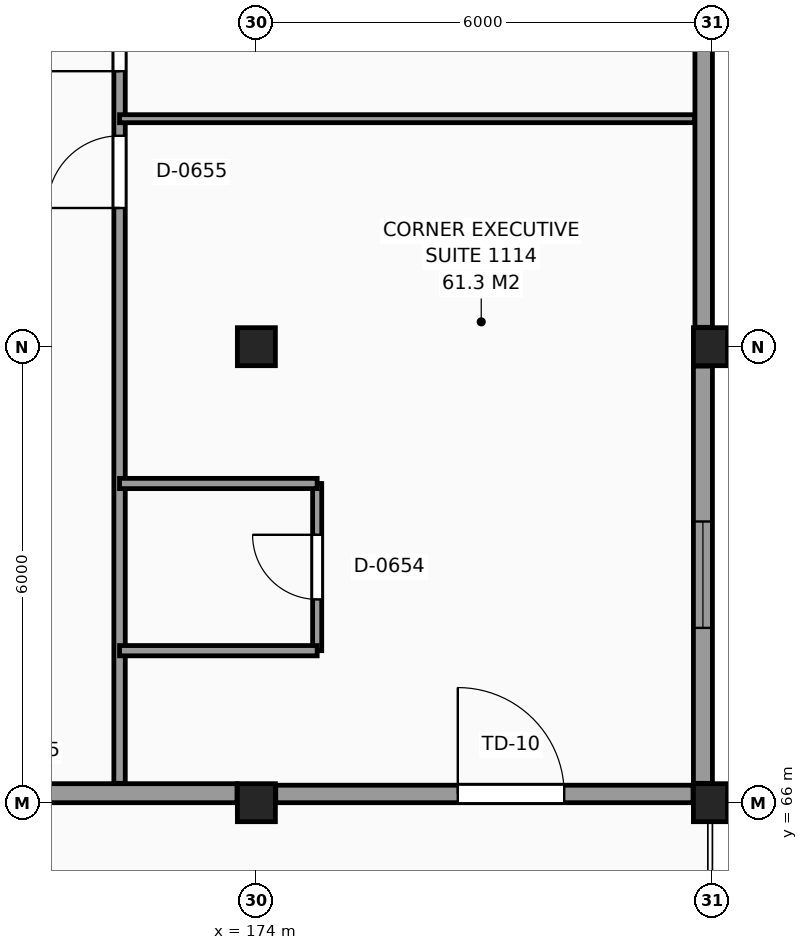
"""IFC4 building model, lengths in metres.
Left out: names, types, materials, properties, quantities, classifications, styles, units other than length and angle.
Written with IfcOpenShell. Run it as: python <this file> out.ifc"""

import sys

from ifc_helpers import new_model, si_unit, direction, frame, frame_2d, origin, origin_2d, place, context, subcontext, project, spatial, rectangle, extrude, element, fill, save


model = new_model("IFC4")
c1 = context("Model", 3, precision=1e-05, world=origin(), true_north=direction((0.0, 1.0)))
c2 = subcontext(c1, "Body", "Model", "MODEL_VIEW")
j1 = project(units=[si_unit("LENGTHUNIT", "METRE"), si_unit("PLANEANGLEUNIT", "RADIAN")], contexts=[c1])
p1 = place(None, origin())
s1 = spatial("IfcSite", under=j1, at=p1, CompositionType="ELEMENT")
p2 = place(p1, origin())
s2 = spatial("IfcBuilding", under=s1, at=p2, CompositionType="ELEMENT")
p3 = place(p2, frame((0.0, 0.0, 44.7)))
s3 = spatial("IfcBuildingStorey", under=s2, at=p3, CompositionType="ELEMENT", Elevation=44.7)
for number, where, z_axis, x_axis in (
    (1, (174.0, 66.0, 0.0), (0.0, 0.0, 1.0), (1.0, 0.0, 0.0)),
    (2, (174.0, 72.0, 0.0), (0.0, 0.0, 1.0), (1.0, 0.0, 0.0)),
    (3, (180.0, 66.0, 0.0), (0.0, 0.0, 1.0), (1.0, 0.0, 0.0)),
    (4, (180.0, 72.0, 0.0), (0.0, 0.0, 1.0), (1.0, 0.0, 0.0)),
):
    element("IfcColumn", number, at=place(p3, frame(where, z_axis=z_axis, x_axis=x_axis)), inside=s3, PredefinedType="COLUMN", context=c2, shape_type="SweptSolid", body=[
        extrude(rectangle(XDim=0.5, YDim=0.5, at=origin_2d()), origin(), (0.0, 0.0, 1.0), 3.3),
    ])
p4 = place(p3, frame((179.875, 66.255, 0.0), z_axis=(0.0, 0.0, 1.0), x_axis=(0.0, 1.0, 0.0)))
e5 = element("IfcWall", 5, at=p4, inside=s3, PredefinedType="SOLIDWALL", context=c2, shape_type="SweptSolid", body=[
    extrude(rectangle(XDim=5.49, YDim=0.25, at=frame_2d((2.745, 0.0))), origin(), (0.0, 0.0, 1.0), 2.4),
])
p5 = place(p4, frame((2.045, 0.0, 0.8)))
e6 = element("IfcOpeningElement", 6, at=p5, cuts=e5, PredefinedType="OPENING", context=c2, shape_type="SweptSolid", body=[
    extrude(rectangle(XDim=1.4, YDim=1.4, at=frame_2d((0.7, 0.7))), frame((0.0, 0.135, 0.0), z_axis=(0.0, -1.0, 0.0), x_axis=(1.0, 0.0, 0.0)), (0.0, 0.0, 1.0), 0.27),
])
p6 = place(p3, frame((179.885, 72.255, 0.0), z_axis=(0.0, 0.0, 1.0), x_axis=(0.0, 1.0, 0.0)))
e7 = element("IfcWall", 7, at=p6, inside=s3, PredefinedType="SOLIDWALL", context=c2, shape_type="SweptSolid", body=[
    extrude(rectangle(XDim=5.49, YDim=0.23, at=frame_2d((2.745, 0.0))), origin(), (0.0, 0.0, 1.0), 2.4),
])
p7 = place(p3, frame((168.255, 66.125, 0.0), z_axis=(0.0, 0.0, 1.0), x_axis=(1.0, 0.0, 0.0)))
e8 = element("IfcWall", 8, at=p7, inside=s3, PredefinedType="SOLIDWALL", context=c2, shape_type="SweptSolid", body=[
    extrude(rectangle(XDim=5.49, YDim=0.25, at=frame_2d((2.745, 0.0))), origin(), (0.0, 0.0, 1.0), 2.25),
])
p8 = place(p3, frame((174.255, 66.115, 0.0), z_axis=(0.0, 0.0, 1.0), x_axis=(1.0, 0.0, 0.0)))
e9 = element("IfcWall", 9, at=p8, inside=s3, PredefinedType="SOLIDWALL", context=c2, shape_type="SweptSolid", body=[
    extrude(rectangle(XDim=5.49, YDim=0.23, at=frame_2d((2.745, 0.0))), origin(), (0.0, 0.0, 1.0), 2.25),
])
p9 = place(p8, frame((2.395, 0.0, 0.0)))
e10 = element("IfcOpeningElement", 10, at=p9, cuts=e9, PredefinedType="OPENING", context=c2, shape_type="SweptSolid", body=[
    extrude(rectangle(XDim=1.4, YDim=2.1, at=frame_2d((0.7, 1.05))), frame((0.0, 0.125, 0.0), z_axis=(0.0, -1.0, 0.0), x_axis=(1.0, 0.0, 0.0)), (0.0, 0.0, 1.0), 0.25),
])
p10 = place(p3, frame((172.2, 66.255, 0.0), z_axis=(0.0, 0.0, 1.0), x_axis=(0.0, 1.0, 0.0)))
e11 = element("IfcWall", 11, at=p10, inside=s3, PredefinedType="PARTITIONING", context=c2, shape_type="SweptSolid", body=[
    extrude(rectangle(XDim=41.565, YDim=0.15, at=frame_2d((20.783, 0.0))), origin(), (0.0, 0.0, 1.0), 3.05),
])
p11 = place(p10, frame((7.57, 0.0, 0.0)))
e12 = element("IfcOpeningElement", 12, at=p11, cuts=e11, PredefinedType="OPENING", context=c2, shape_type="SweptSolid", body=[
    extrude(rectangle(XDim=0.95, YDim=2.1, at=frame_2d((0.475, 1.05))), frame((0.0, 0.085, 0.0), z_axis=(0.0, -1.0, 0.0), x_axis=(1.0, 0.0, 0.0)), (0.0, 0.0, 1.0), 0.17),
])
p12 = place(p10, frame((9.37, 0.0, 0.0)))
e13 = element("IfcOpeningElement", 13, at=p12, cuts=e11, PredefinedType="OPENING", context=c2, shape_type="SweptSolid", body=[
    extrude(rectangle(XDim=0.95, YDim=2.1, at=frame_2d((0.475, 1.05))), frame((0.0, 0.085, 0.0), z_axis=(0.0, -1.0, 0.0), x_axis=(1.0, 0.0, 0.0)), (0.0, 0.0, 1.0), 0.17),
])
p13 = place(p10, frame((18.47, 0.0, 0.0)))
e14 = element("IfcOpeningElement", 14, at=p13, cuts=e11, PredefinedType="OPENING", context=c2, shape_type="SweptSolid", body=[
    extrude(rectangle(XDim=0.95, YDim=2.1, at=frame_2d((0.475, 1.05))), frame((0.0, 0.085, 0.0), z_axis=(0.0, -1.0, 0.0), x_axis=(1.0, 0.0, 0.0)), (0.0, 0.0, 1.0), 0.17),
])
p14 = place(p10, frame((22.87, 0.0, 0.0)))
e15 = element("IfcOpeningElement", 15, at=p14, cuts=e11, PredefinedType="OPENING", context=c2, shape_type="SweptSolid", body=[
    extrude(rectangle(XDim=0.95, YDim=2.1, at=frame_2d((0.475, 1.05))), frame((0.0, 0.085, 0.0), z_axis=(0.0, -1.0, 0.0), x_axis=(1.0, 0.0, 0.0)), (0.0, 0.0, 1.0), 0.17),
])
p15 = place(p10, frame((30.07, 0.0, 0.0)))
e16 = element("IfcOpeningElement", 16, at=p15, cuts=e11, PredefinedType="OPENING", context=c2, shape_type="SweptSolid", body=[
    extrude(rectangle(XDim=0.95, YDim=2.1, at=frame_2d((0.475, 1.05))), frame((0.0, 0.085, 0.0), z_axis=(0.0, -1.0, 0.0), x_axis=(1.0, 0.0, 0.0)), (0.0, 0.0, 1.0), 0.17),
])
p16 = place(p10, frame((38.32, 0.0, 0.0)))
e17 = element("IfcOpeningElement", 17, at=p16, cuts=e11, PredefinedType="OPENING", context=c2, shape_type="SweptSolid", body=[
    extrude(rectangle(XDim=0.95, YDim=2.1, at=frame_2d((0.475, 1.05))), frame((0.0, 0.085, 0.0), z_axis=(0.0, -1.0, 0.0), x_axis=(1.0, 0.0, 0.0)), (0.0, 0.0, 1.0), 0.17),
])
p17 = place(p3, frame((174.8, 68.0, 0.0), z_axis=(0.0, 0.0, 1.0), x_axis=(0.0, 1.0, 0.0)))
e18 = element("IfcWall", 18, at=p17, inside=s3, PredefinedType="PARTITIONING", context=c2, shape_type="SweptSolid", body=[
    extrude(rectangle(XDim=2.2, YDim=0.12, at=frame_2d((1.1, 0.0))), origin(), (0.0, 0.0, 1.0), 3.05),
])
p18 = place(p17, frame((0.675, 0.0, 0.0)))
e19 = element("IfcOpeningElement", 19, at=p18, cuts=e18, PredefinedType="OPENING", context=c2, shape_type="SweptSolid", body=[
    extrude(rectangle(XDim=0.85, YDim=2.1, at=frame_2d((0.425, 1.05))), frame((0.0, 0.07, 0.0), z_axis=(0.0, -1.0, 0.0), x_axis=(1.0, 0.0, 0.0)), (0.0, 0.0, 1.0), 0.14),
])
for number, where, z_axis, x_axis in (
    (20, (172.2, 68.0, 0.0), (0.0, 0.0, 1.0), (1.0, 0.0, 0.0)),
    (21, (172.2, 70.2, 0.0), (0.0, 0.0, 1.0), (1.0, 0.0, 0.0)),
):
    element("IfcWall", number, at=place(p3, frame(where, z_axis=z_axis, x_axis=x_axis)), inside=s3, PredefinedType="PARTITIONING", context=c2, shape_type="SweptSolid", body=[
        extrude(rectangle(XDim=2.6, YDim=0.135, at=frame_2d((1.3, 0.0))), origin(), (0.0, 0.0, 1.0), 3.05),
    ])
p19 = place(p3, frame((172.2, 75.0, 0.0), z_axis=(0.0, 0.0, 1.0), x_axis=(1.0, 0.0, 0.0)))
e22 = element("IfcWall", 22, at=p19, inside=s3, PredefinedType="PARTITIONING", context=c2, shape_type="SweptSolid", body=[
    extrude(rectangle(XDim=7.565, YDim=0.105, at=frame_2d((3.782, 0.0))), origin(), (0.0, 0.0, 1.0), 3.05),
])
p20 = place(p9, frame((1.4, 0.0, 0.0), z_axis=(0.0, 0.0, 1.0), x_axis=(-1.0, 0.0, 0.0)))
e23 = element("IfcDoor", 23, at=p20, inside=s3, OperationType="SINGLE_SWING_LEFT", PredefinedType="DOOR", context=c2, shape_type="SweptSolid", body=[
    extrude(rectangle(XDim=1.4, YDim=2.1, at=frame_2d((0.7, 1.05))), frame((0.0, 0.025, 0.0), z_axis=(0.0, -1.0, 0.0), x_axis=(1.0, 0.0, 0.0)), (0.0, 0.0, 1.0), 0.05),
])
fill(e10, e23)
p21 = place(p5, origin())
e24 = element("IfcWindow", 24, at=p21, inside=s3, PartitioningType="SINGLE_PANEL", PredefinedType="WINDOW", context=c2, shape_type="SweptSolid", body=[
    extrude(rectangle(XDim=1.4, YDim=1.4, at=frame_2d((0.7, 0.7))), frame((0.0, 0.03, 0.0), z_axis=(0.0, -1.0, 0.0), x_axis=(1.0, 0.0, 0.0)), (0.0, 0.0, 1.0), 0.06),
])
fill(e6, e24)
p22 = place(p18, origin())
e25 = element("IfcDoor", 25, at=p22, inside=s3, OperationType="SINGLE_SWING_RIGHT", PredefinedType="DOOR", context=c2, shape_type="SweptSolid", body=[
    extrude(rectangle(XDim=0.85, YDim=2.1, at=frame_2d((0.425, 1.05))), frame((0.0, 0.025, 0.0), z_axis=(0.0, -1.0, 0.0), x_axis=(1.0, 0.0, 0.0)), (0.0, 0.0, 1.0), 0.05),
])
fill(e19, e25)
p23 = place(p11, origin())
e26 = element("IfcDoor", 26, at=p23, inside=s3, OperationType="SINGLE_SWING_LEFT", PredefinedType="DOOR", context=c2, shape_type="SweptSolid", body=[
    extrude(rectangle(XDim=0.95, YDim=2.1, at=frame_2d((0.475, 1.05))), frame((0.0, 0.025, 0.0), z_axis=(0.0, -1.0, 0.0), x_axis=(1.0, 0.0, 0.0)), (0.0, 0.0, 1.0), 0.05),
])
fill(e12, e26)
p24 = place(p12, origin())
e27 = element("IfcDoor", 27, at=p24, inside=s3, OperationType="SINGLE_SWING_LEFT", PredefinedType="DOOR", context=c2, shape_type="SweptSolid", body=[
    extrude(rectangle(XDim=0.95, YDim=2.1, at=frame_2d((0.475, 1.05))), frame((0.0, 0.025, 0.0), z_axis=(0.0, -1.0, 0.0), x_axis=(1.0, 0.0, 0.0)), (0.0, 0.0, 1.0), 0.05),
])
fill(e13, e27)
save(model, sys.argv[1])
